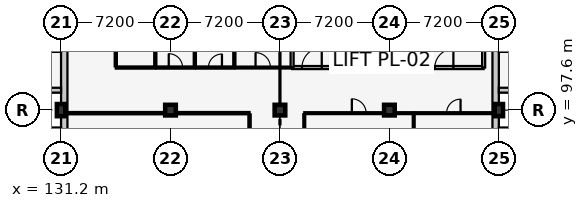
"""IFC4 building model, lengths in metres.
Left out: names, types, materials, properties, quantities, classifications, styles, units other than length and angle.
Written with IfcOpenShell. Run it as: python <this file> out.ifc"""

import sys

from ifc_helpers import new_model, si_unit, direction, frame, frame_2d, origin, origin_2d, place, context, subcontext, project, spatial, rectangle, extrude, element, fill, save


model = new_model("IFC4")
c1 = context("Model", 3, precision=1e-05, world=origin(), true_north=direction((0.0, 1.0)))
c2 = subcontext(c1, "Body", "Model", "MODEL_VIEW")
j1 = project(units=[si_unit("LENGTHUNIT", "METRE"), si_unit("PLANEANGLEUNIT", "RADIAN")], contexts=[c1])
p1 = place(None, origin())
s1 = spatial("IfcSite", under=j1, at=p1, CompositionType="ELEMENT")
p2 = place(p1, origin())
s2 = spatial("IfcBuilding", under=s1, at=p2, CompositionType="ELEMENT")
p3 = place(p2, frame((0.0, 0.0, 13.8)))
s3 = spatial("IfcBuildingStorey", under=s2, at=p3, CompositionType="ELEMENT", Elevation=13.8)
p4 = place(p3, frame((131.2, 97.6, 0.0), z_axis=(0.0, 0.0, 1.0), x_axis=(1.0, 0.0, 0.0)))
e1 = element("IfcColumn", 1, at=p4, inside=s3, PredefinedType="COLUMN", context=c2, shape_type="SweptSolid", body=[
    extrude(rectangle(XDim=0.55, YDim=0.8, at=origin_2d()), origin(), (0.0, 0.0, 1.0), 4.2),
])
for number, where, z_axis, x_axis in (
    (2, (138.4, 97.6, 0.0), (0.0, 0.0, 1.0), (1.0, 0.0, 0.0)),
    (3, (145.6, 97.6, 0.0), (0.0, 0.0, 1.0), (1.0, 0.0, 0.0)),
    (4, (152.8, 97.6, 0.0), (0.0, 0.0, 1.0), (1.0, 0.0, 0.0)),
):
    element("IfcColumn", number, at=place(p3, frame(where, z_axis=z_axis, x_axis=x_axis)), inside=s3, PredefinedType="COLUMN", context=c2, shape_type="SweptSolid", body=[
        extrude(rectangle(XDim=0.7, YDim=0.7, at=origin_2d()), origin(), (0.0, 0.0, 1.0), 4.2),
    ])
p5 = place(p3, frame((160.0, 97.6, 0.0), z_axis=(0.0, 0.0, 1.0), x_axis=(1.0, 0.0, 0.0)))
e5 = element("IfcColumn", 5, at=p5, inside=s3, PredefinedType="COLUMN", context=c2, shape_type="SweptSolid", body=[
    extrude(rectangle(XDim=0.55, YDim=0.8, at=origin_2d()), origin(), (0.0, 0.0, 1.0), 4.2),
])
p6 = place(p3, frame((159.79, 112.0, 0.0), z_axis=(0.0, 0.0, 1.0), x_axis=(0.0, -1.0, 0.0)))
e6 = element("IfcWall", 6, at=p6, inside=s3, PredefinedType="SOLIDWALL", context=c2, shape_type="SweptSolid", body=[
    extrude(rectangle(XDim=28.8, YDim=0.42, at=frame_2d((14.4, 0.0))), origin(), (0.0, 0.0, 1.0), 3.205),
])
for number, where, z_axis, x_axis in (
    (7, (160.0, 96.29, 0.0), (0.0, 0.0, 1.0), (1.0, 0.0, 0.0)),
    (8, (160.0, 98.91, 0.0), (0.0, 0.0, 1.0), (1.0, 0.0, 0.0)),
):
    element("IfcWall", number, at=place(p3, frame(where, z_axis=z_axis, x_axis=x_axis)), inside=s3, PredefinedType="SOLIDWALL", context=c2, shape_type="SweptSolid", body=[
        extrude(rectangle(XDim=1.35, YDim=0.32, at=frame_2d((0.675, 0.0))), origin(), (0.0, 0.0, 1.0), 3.93),
    ])
p7 = place(p3, frame((131.41, 83.2, 0.0), z_axis=(0.0, 0.0, 1.0), x_axis=(0.0, 1.0, 0.0)))
e9 = element("IfcWall", 9, at=p7, inside=s3, PredefinedType="SOLIDWALL", context=c2, shape_type="SweptSolid", body=[
    extrude(rectangle(XDim=28.8, YDim=0.42, at=frame_2d((14.4, 0.0))), origin(), (0.0, 0.0, 1.0), 3.205),
])
for number, where, z_axis, x_axis in (
    (10, (131.2, 96.29, 0.0), (0.0, 0.0, 1.0), (-1.0, 0.0, 0.0)),
    (11, (131.2, 98.91, 0.0), (0.0, 0.0, 1.0), (-1.0, 0.0, 0.0)),
):
    element("IfcWall", number, at=place(p3, frame(where, z_axis=z_axis, x_axis=x_axis)), inside=s3, PredefinedType="SOLIDWALL", context=c2, shape_type="SweptSolid", body=[
        extrude(rectangle(XDim=1.793, YDim=0.32, at=frame_2d((0.896, 0.0))), origin(), (0.0, 0.0, 1.0), 3.93),
    ])
p8 = place(p3, frame((146.4, 100.4, 0.0), z_axis=(0.0, 0.0, 1.0), x_axis=(1.0, 0.0, 0.0)))
e12 = element("IfcWall", 12, at=p8, inside=s3, PredefinedType="PARTITIONING", context=c2, shape_type="SweptSolid", body=[
    extrude(rectangle(XDim=2.6, YDim=0.2, at=frame_2d((1.3, 0.0))), origin(), (0.0, 0.0, 1.0), 3.95),
])
p9 = place(p8, frame((0.65, 0.0, 0.0)))
e13 = element("IfcOpeningElement", 13, at=p9, cuts=e12, PredefinedType="OPENING", context=c2, shape_type="SweptSolid", body=[
    extrude(rectangle(XDim=1.3, YDim=2.2, at=frame_2d((0.65, 1.1))), frame((0.0, 0.112, 0.0), z_axis=(0.0, -1.0, 0.0), x_axis=(1.0, 0.0, 0.0)), (0.0, 0.0, 1.0), 0.224),
])
p10 = place(p3, frame((146.4, 106.2, 0.0), z_axis=(0.0, 0.0, 1.0), x_axis=(0.0, -1.0, 0.0)))
e14 = element("IfcWall", 14, at=p10, inside=s3, PredefinedType="PARTITIONING", context=c2, shape_type="SweptSolid", body=[
    extrude(rectangle(XDim=5.8, YDim=0.2, at=frame_2d((2.9, 0.0))), origin(), (0.0, 0.0, 1.0), 3.95),
])
p11 = place(p3, frame((149.0, 100.4, 0.0), z_axis=(0.0, 0.0, 1.0), x_axis=(0.0, 1.0, 0.0)))
e15 = element("IfcWall", 15, at=p11, inside=s3, PredefinedType="PARTITIONING", context=c2, shape_type="SweptSolid", body=[
    extrude(rectangle(XDim=5.8, YDim=0.2, at=frame_2d((2.9, 0.0))), origin(), (0.0, 0.0, 1.0), 3.525),
])
p12 = place(p3, frame((153.8, 100.4, 0.0), z_axis=(0.0, 0.0, 1.0), x_axis=(1.0, 0.0, 0.0)))
e16 = element("IfcWall", 16, at=p12, inside=s3, PredefinedType="PARTITIONING", context=c2, shape_type="SweptSolid", body=[
    extrude(rectangle(XDim=5.2, YDim=0.2, at=frame_2d((2.6, 0.0))), origin(), (0.0, 0.0, 1.0), 3.95),
])
p13 = place(p12, frame((1.99, 0.0, 0.0)))
e17 = element("IfcOpeningElement", 17, at=p13, cuts=e16, PredefinedType="OPENING", context=c2, shape_type="SweptSolid", body=[
    extrude(rectangle(XDim=1.22, YDim=2.2, at=frame_2d((0.61, 1.1))), frame((0.0, 0.112, 0.0), z_axis=(0.0, -1.0, 0.0), x_axis=(1.0, 0.0, 0.0)), (0.0, 0.0, 1.0), 0.224),
])
for number, where, z_axis, x_axis in (
    (18, (153.8, 106.2, 0.0), (0.0, 0.0, 1.0), (0.0, -1.0, 0.0)),
    (19, (159.0, 100.4, 0.0), (0.0, 0.0, 1.0), (0.0, 1.0, 0.0)),
):
    element("IfcWall", number, at=place(p3, frame(where, z_axis=z_axis, x_axis=x_axis)), inside=s3, PredefinedType="PARTITIONING", context=c2, shape_type="SweptSolid", body=[
        extrude(rectangle(XDim=5.8, YDim=0.2, at=frame_2d((2.9, 0.0))), origin(), (0.0, 0.0, 1.0), 3.95),
    ])
p14 = place(p3, frame((134.8, 100.4, 0.0), z_axis=(0.0, 0.0, 1.0), x_axis=(1.0, 0.0, 0.0)))
e20 = element("IfcWall", 20, at=p14, inside=s3, PredefinedType="PARTITIONING", context=c2, shape_type="SweptSolid", body=[
    extrude(rectangle(XDim=2.6, YDim=0.14, at=frame_2d((1.3, 0.0))), origin(), (0.0, 0.0, 1.0), 3.95),
])
p15 = place(p3, frame((134.8, 100.48, 0.0), z_axis=(0.0, 0.0, 1.0), x_axis=(0.0, 1.0, 0.0)))
e21 = element("IfcWall", 21, at=p15, inside=s3, PredefinedType="PARTITIONING", context=c2, shape_type="SweptSolid", body=[
    extrude(rectangle(XDim=4.86, YDim=0.14, at=frame_2d((2.43, 0.0))), origin(), (0.0, 0.0, 1.0), 3.685),
])
p16 = place(p15, frame((1.93, 0.0, 0.0)))
e22 = element("IfcOpeningElement", 22, at=p16, cuts=e21, PredefinedType="OPENING", context=c2, shape_type="SweptSolid", body=[
    extrude(rectangle(XDim=1.0, YDim=2.1, at=frame_2d((0.5, 1.05))), frame((0.0, 0.082, 0.0), z_axis=(0.0, -1.0, 0.0), x_axis=(1.0, 0.0, 0.0)), (0.0, 0.0, 1.0), 0.164),
])
p17 = place(p3, frame((137.4, 100.48, 0.0), z_axis=(0.0, 0.0, 1.0), x_axis=(0.0, 1.0, 0.0)))
e23 = element("IfcWall", 23, at=p17, inside=s3, PredefinedType="PARTITIONING", context=c2, shape_type="SweptSolid", body=[
    extrude(rectangle(XDim=4.86, YDim=0.14, at=frame_2d((2.43, 0.0))), origin(), (0.0, 0.0, 1.0), 3.95),
])
p18 = place(p3, frame((137.48, 100.4, 0.0), z_axis=(0.0, 0.0, 1.0), x_axis=(1.0, 0.0, 0.0)))
e24 = element("IfcWall", 24, at=p18, inside=s3, PredefinedType="PARTITIONING", context=c2, shape_type="SweptSolid", body=[
    extrude(rectangle(XDim=2.52, YDim=0.14, at=frame_2d((1.26, 0.0))), origin(), (0.0, 0.0, 1.0), 3.95),
])
p19 = place(p18, frame((0.805, 0.0, 0.0)))
e25 = element("IfcOpeningElement", 25, at=p19, cuts=e24, PredefinedType="OPENING", context=c2, shape_type="SweptSolid", body=[
    extrude(rectangle(XDim=0.91, YDim=2.06, at=frame_2d((0.455, 1.03))), frame((0.0, 0.082, 0.0), z_axis=(0.0, -1.0, 0.0), x_axis=(1.0, 0.0, 0.0)), (0.0, 0.0, 1.0), 0.164),
])
p20 = place(p3, frame((140.0, 100.48, 0.0), z_axis=(0.0, 0.0, 1.0), x_axis=(0.0, 1.0, 0.0)))
e26 = element("IfcWall", 26, at=p20, inside=s3, PredefinedType="PARTITIONING", context=c2, shape_type="SweptSolid", body=[
    extrude(rectangle(XDim=4.86, YDim=0.14, at=frame_2d((2.43, 0.0))), origin(), (0.0, 0.0, 1.0), 3.95),
])
p21 = place(p3, frame((140.08, 100.4, 0.0), z_axis=(0.0, 0.0, 1.0), x_axis=(1.0, 0.0, 0.0)))
e27 = element("IfcWall", 27, at=p21, inside=s3, PredefinedType="PARTITIONING", context=c2, shape_type="SweptSolid", body=[
    extrude(rectangle(XDim=2.52, YDim=0.14, at=frame_2d((1.26, 0.0))), origin(), (0.0, 0.0, 1.0), 3.95),
])
p22 = place(p21, frame((0.815, 0.0, 0.0)))
e28 = element("IfcOpeningElement", 28, at=p22, cuts=e27, PredefinedType="OPENING", context=c2, shape_type="SweptSolid", body=[
    extrude(rectangle(XDim=0.89, YDim=2.05, at=frame_2d((0.445, 1.025))), frame((0.0, 0.082, 0.0), z_axis=(0.0, -1.0, 0.0), x_axis=(1.0, 0.0, 0.0)), (0.0, 0.0, 1.0), 0.164),
])
p23 = place(p3, frame((142.6, 100.48, 0.0), z_axis=(0.0, 0.0, 1.0), x_axis=(0.0, 1.0, 0.0)))
e29 = element("IfcWall", 29, at=p23, inside=s3, PredefinedType="PARTITIONING", context=c2, shape_type="SweptSolid", body=[
    extrude(rectangle(XDim=4.86, YDim=0.14, at=frame_2d((2.43, 0.0))), origin(), (0.0, 0.0, 1.0), 3.95),
])
p24 = place(p3, frame((142.68, 100.4, 0.0), z_axis=(0.0, 0.0, 1.0), x_axis=(1.0, 0.0, 0.0)))
e30 = element("IfcWall", 30, at=p24, inside=s3, PredefinedType="PARTITIONING", context=c2, shape_type="SweptSolid", body=[
    extrude(rectangle(XDim=3.61, YDim=0.125, at=frame_2d((1.805, 0.0))), origin(), (0.0, 0.0, 1.0), 3.95),
])
p25 = place(p24, frame((1.315, 0.0, 0.0)))
e31 = element("IfcOpeningElement", 31, at=p25, cuts=e30, PredefinedType="OPENING", context=c2, shape_type="SweptSolid", body=[
    extrude(rectangle(XDim=0.98, YDim=2.12, at=frame_2d((0.49, 1.06))), frame((0.0, 0.074, 0.0), z_axis=(0.0, -1.0, 0.0), x_axis=(1.0, 0.0, 0.0)), (0.0, 0.0, 1.0), 0.149),
])
p26 = place(p3, frame((131.63, 97.4, 0.0), z_axis=(0.0, 0.0, 1.0), x_axis=(1.0, 0.0, 0.0)))
e32 = element("IfcWall", 32, at=p26, inside=s3, PredefinedType="PARTITIONING", context=c2, shape_type="SweptSolid", body=[
    extrude(rectangle(XDim=11.97, YDim=0.15, at=frame_2d((5.985, 0.0))), origin(), (0.0, 0.0, 1.0), 3.175),
])
p27 = place(p3, frame((143.6, 90.485, 0.0), z_axis=(0.0, 0.0, 1.0), x_axis=(0.0, 1.0, 0.0)))
e33 = element("IfcWall", 33, at=p27, inside=s3, PredefinedType="PARTITIONING", context=c2, shape_type="SweptSolid", body=[
    extrude(rectangle(XDim=6.83, YDim=0.15, at=frame_2d((3.415, 0.0))), origin(), (0.0, 0.0, 1.0), 3.95),
])
p28 = place(p3, frame((147.2, 97.4, 0.0), z_axis=(0.0, 0.0, 1.0), x_axis=(1.0, 0.0, 0.0)))
e34 = element("IfcWall", 34, at=p28, inside=s3, PredefinedType="PARTITIONING", context=c2, shape_type="SweptSolid", body=[
    extrude(rectangle(XDim=7.2, YDim=0.125, at=frame_2d((3.6, 0.0))), origin(), (0.0, 0.0, 1.0), 3.075),
])
p29 = place(p28, frame((3.13, 0.0, 0.0)))
e35 = element("IfcOpeningElement", 35, at=p29, cuts=e34, PredefinedType="OPENING", context=c2, shape_type="SweptSolid", body=[
    extrude(rectangle(XDim=0.94, YDim=2.1, at=frame_2d((0.47, 1.05))), frame((0.0, 0.074, 0.0), z_axis=(0.0, -1.0, 0.0), x_axis=(1.0, 0.0, 0.0)), (0.0, 0.0, 1.0), 0.149),
])
for number, where, z_axis, x_axis in (
    (36, (147.2, 90.472, 0.0), (0.0, 0.0, 1.0), (0.0, 1.0, 0.0)),
    (37, (154.4, 90.472, 0.0), (0.0, 0.0, 1.0), (0.0, 1.0, 0.0)),
):
    element("IfcWall", number, at=place(p3, frame(where, z_axis=z_axis, x_axis=x_axis)), inside=s3, PredefinedType="PARTITIONING", context=c2, shape_type="SweptSolid", body=[
        extrude(rectangle(XDim=6.855, YDim=0.125, at=frame_2d((3.427, 0.0))), origin(), (0.0, 0.0, 1.0), 3.95),
    ])
p30 = place(p3, frame((154.472, 97.4, 0.0), z_axis=(0.0, 0.0, 1.0), x_axis=(1.0, 0.0, 0.0)))
e38 = element("IfcWall", 38, at=p30, inside=s3, PredefinedType="PARTITIONING", context=c2, shape_type="SweptSolid", body=[
    extrude(rectangle(XDim=5.098, YDim=0.125, at=frame_2d((2.549, 0.0))), origin(), (0.0, 0.0, 1.0), 3.275),
])
p31 = place(p30, frame((2.089, 0.0, 0.0)))
e39 = element("IfcOpeningElement", 39, at=p31, cuts=e38, PredefinedType="OPENING", context=c2, shape_type="SweptSolid", body=[
    extrude(rectangle(XDim=0.92, YDim=2.08, at=frame_2d((0.46, 1.04))), frame((0.0, 0.074, 0.0), z_axis=(0.0, -1.0, 0.0), x_axis=(1.0, 0.0, 0.0)), (0.0, 0.0, 1.0), 0.149),
])
p32 = place(p9, origin())
e40 = element("IfcDoor", 40, at=p32, inside=s3, OperationType="SINGLE_SWING_RIGHT", PredefinedType="DOOR", context=c2, shape_type="SweptSolid", body=[
    extrude(rectangle(XDim=1.3, YDim=2.2, at=frame_2d((0.65, 1.1))), frame((0.0, 0.025, 0.0), z_axis=(0.0, -1.0, 0.0), x_axis=(1.0, 0.0, 0.0)), (0.0, 0.0, 1.0), 0.05),
])
fill(e13, e40)
p33 = place(p13, origin())
e41 = element("IfcDoor", 41, at=p33, inside=s3, OperationType="SINGLE_SWING_RIGHT", PredefinedType="DOOR", context=c2, shape_type="SweptSolid", body=[
    extrude(rectangle(XDim=1.22, YDim=2.2, at=frame_2d((0.61, 1.1))), frame((0.0, 0.025, 0.0), z_axis=(0.0, -1.0, 0.0), x_axis=(1.0, 0.0, 0.0)), (0.0, 0.0, 1.0), 0.05),
])
fill(e17, e41)
p34 = place(p19, origin())
e42 = element("IfcDoor", 42, at=p34, inside=s3, OperationType="SINGLE_SWING_LEFT", PredefinedType="DOOR", context=c2, shape_type="SweptSolid", body=[
    extrude(rectangle(XDim=0.91, YDim=2.06, at=frame_2d((0.455, 1.03))), frame((0.0, 0.025, 0.0), z_axis=(0.0, -1.0, 0.0), x_axis=(1.0, 0.0, 0.0)), (0.0, 0.0, 1.0), 0.05),
])
fill(e25, e42)
p35 = place(p22, origin())
e43 = element("IfcDoor", 43, at=p35, inside=s3, OperationType="SINGLE_SWING_RIGHT", PredefinedType="DOOR", context=c2, shape_type="SweptSolid", body=[
    extrude(rectangle(XDim=0.89, YDim=2.05, at=frame_2d((0.445, 1.025))), frame((0.0, 0.025, 0.0), z_axis=(0.0, -1.0, 0.0), x_axis=(1.0, 0.0, 0.0)), (0.0, 0.0, 1.0), 0.05),
])
fill(e28, e43)
p36 = place(p25, origin())
e44 = element("IfcDoor", 44, at=p36, inside=s3, OperationType="SINGLE_SWING_LEFT", PredefinedType="DOOR", context=c2, shape_type="SweptSolid", body=[
    extrude(rectangle(XDim=0.98, YDim=2.12, at=frame_2d((0.49, 1.06))), frame((0.0, 0.025, 0.0), z_axis=(0.0, -1.0, 0.0), x_axis=(1.0, 0.0, 0.0)), (0.0, 0.0, 1.0), 0.05),
])
fill(e31, e44)
p37 = place(p29, origin())
e45 = element("IfcDoor", 45, at=p37, inside=s3, OperationType="SINGLE_SWING_LEFT", PredefinedType="DOOR", context=c2, shape_type="SweptSolid", body=[
    extrude(rectangle(XDim=0.94, YDim=2.1, at=frame_2d((0.47, 1.05))), frame((0.0, 0.025, 0.0), z_axis=(0.0, -1.0, 0.0), x_axis=(1.0, 0.0, 0.0)), (0.0, 0.0, 1.0), 0.05),
])
fill(e35, e45)
p38 = place(p31, origin())
e46 = element("IfcDoor", 46, at=p38, inside=s3, OperationType="SINGLE_SWING_RIGHT", PredefinedType="DOOR", context=c2, shape_type="SweptSolid", body=[
    extrude(rectangle(XDim=0.92, YDim=2.08, at=frame_2d((0.46, 1.04))), frame((0.0, 0.025, 0.0), z_axis=(0.0, -1.0, 0.0), x_axis=(1.0, 0.0, 0.0)), (0.0, 0.0, 1.0), 0.05),
])
fill(e39, e46)
save(model, sys.argv[1])
